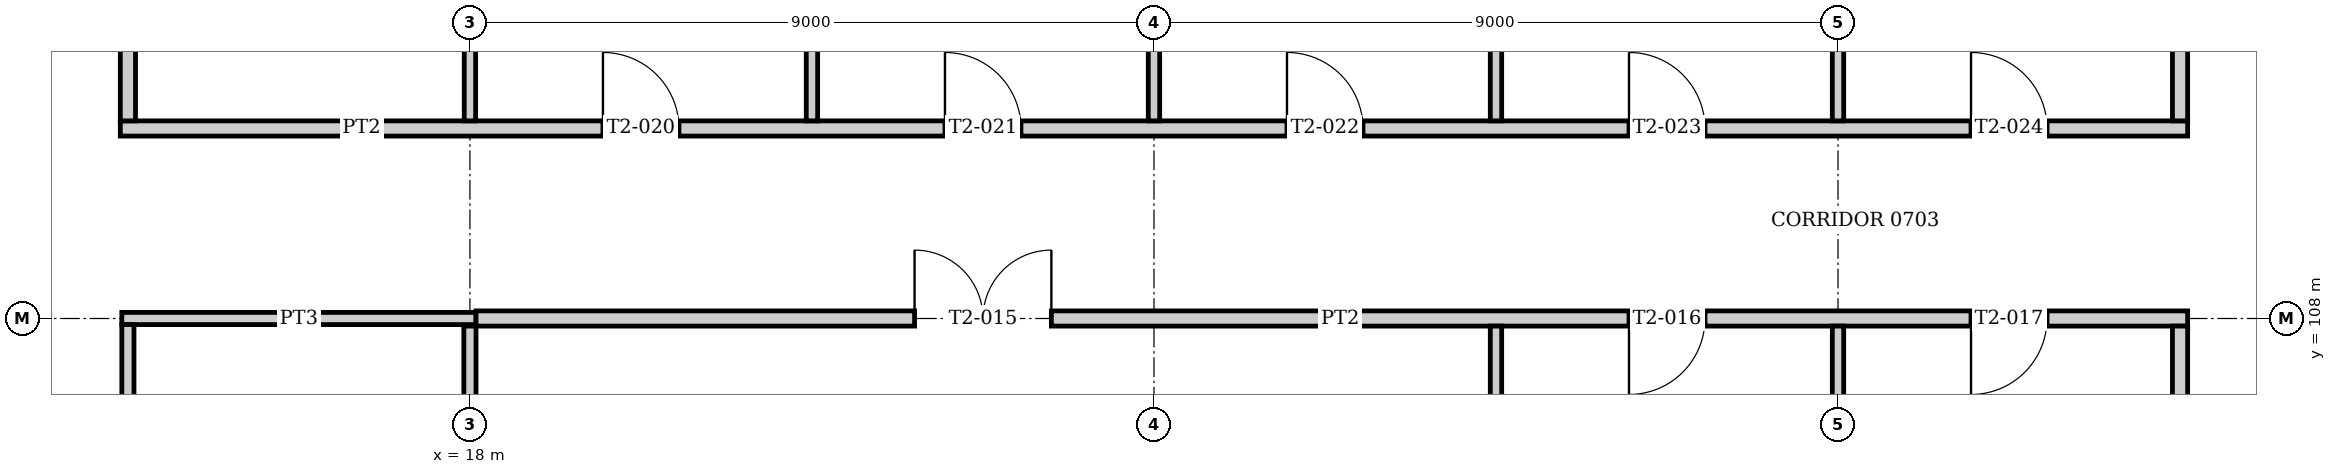
"""IFC4 building model, lengths in metres.
Left out: names, types, materials, properties, quantities, classifications, styles, units other than length and angle.
Written with IfcOpenShell. Run it as: python <this file> out.ifc"""

import sys

from ifc_helpers import new_model, si_unit, direction, frame, frame_2d, origin, place, context, subcontext, project, spatial, rectangle, extrude, element, fill, save


model = new_model("IFC4")
c1 = context("Model", 3, precision=1e-05, world=origin(), true_north=direction((0.0, 1.0)))
c2 = subcontext(c1, "Body", "Model", "MODEL_VIEW")
j1 = project(units=[si_unit("LENGTHUNIT", "METRE"), si_unit("PLANEANGLEUNIT", "RADIAN")], contexts=[c1])
p1 = place(None, origin())
s1 = spatial("IfcSite", under=j1, at=p1, CompositionType="ELEMENT")
p2 = place(p1, origin())
s2 = spatial("IfcBuilding", under=s1, at=p2, CompositionType="ELEMENT")
p3 = place(p2, frame((0.0, 0.0, 31.2)))
s3 = spatial("IfcBuildingStorey", under=s2, at=p3, CompositionType="ELEMENT", Elevation=31.2)
p4 = place(p3, frame((13.42, 108.0, 0.0), z_axis=(0.0, 0.0, 1.0), x_axis=(1.0, 0.0, 0.0)))
e1 = element("IfcWall", 1, at=p4, inside=s3, PredefinedType="PARTITIONING", context=c2, shape_type="SweptSolid", body=[
    extrude(rectangle(XDim=4.66, YDim=0.16, at=frame_2d((2.33, 0.0))), origin(), (0.0, 0.0, 1.0), 3.05),
])
p5 = place(p3, frame((18.08, 108.0, 0.0), z_axis=(0.0, 0.0, 1.0), x_axis=(1.0, 0.0, 0.0)))
e2 = element("IfcWall", 2, at=p5, inside=s3, PredefinedType="PARTITIONING", context=c2, shape_type="SweptSolid", body=[
    extrude(rectangle(XDim=22.52, YDim=0.2, at=frame_2d((11.26, 0.0))), origin(), (0.0, 0.0, 1.0), 3.05),
])
p6 = place(p5, frame((5.77, 0.0, 0.0)))
e3 = element("IfcOpeningElement", 3, at=p6, cuts=e2, PredefinedType="OPENING", context=c2, shape_type="SweptSolid", body=[
    extrude(rectangle(XDim=1.8, YDim=2.1, at=frame_2d((0.9, 1.05))), frame((0.0, 0.11, 0.0), z_axis=(0.0, -1.0, 0.0), x_axis=(1.0, 0.0, 0.0)), (0.0, 0.0, 1.0), 0.22),
])
p7 = place(p5, frame((15.17, 0.0, 0.0)))
e4 = element("IfcOpeningElement", 4, at=p7, cuts=e2, PredefinedType="OPENING", context=c2, shape_type="SweptSolid", body=[
    extrude(rectangle(XDim=1.0, YDim=2.1, at=frame_2d((0.5, 1.05))), frame((0.0, 0.11, 0.0), z_axis=(0.0, -1.0, 0.0), x_axis=(1.0, 0.0, 0.0)), (0.0, 0.0, 1.0), 0.22),
])
p8 = place(p5, frame((19.67, 0.0, 0.0)))
e5 = element("IfcOpeningElement", 5, at=p8, cuts=e2, PredefinedType="OPENING", context=c2, shape_type="SweptSolid", body=[
    extrude(rectangle(XDim=1.0, YDim=2.1, at=frame_2d((0.5, 1.05))), frame((0.0, 0.11, 0.0), z_axis=(0.0, -1.0, 0.0), x_axis=(1.0, 0.0, 0.0)), (0.0, 0.0, 1.0), 0.22),
])
p9 = place(p3, frame((13.4, 110.5, 0.0), z_axis=(0.0, 0.0, 1.0), x_axis=(1.0, 0.0, 0.0)))
e6 = element("IfcWall", 6, at=p9, inside=s3, PredefinedType="PARTITIONING", context=c2, shape_type="SweptSolid", body=[
    extrude(rectangle(XDim=27.2, YDim=0.2, at=frame_2d((13.6, 0.0))), origin(), (0.0, 0.0, 1.0), 3.05),
])
p10 = place(p9, frame((6.35, 0.0, 0.0)))
e7 = element("IfcOpeningElement", 7, at=p10, cuts=e6, PredefinedType="OPENING", context=c2, shape_type="SweptSolid", body=[
    extrude(rectangle(XDim=1.0, YDim=2.1, at=frame_2d((0.5, 1.05))), frame((0.0, 0.11, 0.0), z_axis=(0.0, -1.0, 0.0), x_axis=(1.0, 0.0, 0.0)), (0.0, 0.0, 1.0), 0.22),
])
p11 = place(p9, frame((10.85, 0.0, 0.0)))
e8 = element("IfcOpeningElement", 8, at=p11, cuts=e6, PredefinedType="OPENING", context=c2, shape_type="SweptSolid", body=[
    extrude(rectangle(XDim=1.0, YDim=2.1, at=frame_2d((0.5, 1.05))), frame((0.0, 0.11, 0.0), z_axis=(0.0, -1.0, 0.0), x_axis=(1.0, 0.0, 0.0)), (0.0, 0.0, 1.0), 0.22),
])
p12 = place(p9, frame((15.35, 0.0, 0.0)))
e9 = element("IfcOpeningElement", 9, at=p12, cuts=e6, PredefinedType="OPENING", context=c2, shape_type="SweptSolid", body=[
    extrude(rectangle(XDim=1.0, YDim=2.1, at=frame_2d((0.5, 1.05))), frame((0.0, 0.11, 0.0), z_axis=(0.0, -1.0, 0.0), x_axis=(1.0, 0.0, 0.0)), (0.0, 0.0, 1.0), 0.22),
])
p13 = place(p9, frame((19.85, 0.0, 0.0)))
e10 = element("IfcOpeningElement", 10, at=p13, cuts=e6, PredefinedType="OPENING", context=c2, shape_type="SweptSolid", body=[
    extrude(rectangle(XDim=1.0, YDim=2.1, at=frame_2d((0.5, 1.05))), frame((0.0, 0.11, 0.0), z_axis=(0.0, -1.0, 0.0), x_axis=(1.0, 0.0, 0.0)), (0.0, 0.0, 1.0), 0.22),
])
p14 = place(p9, frame((24.35, 0.0, 0.0)))
e11 = element("IfcOpeningElement", 11, at=p14, cuts=e6, PredefinedType="OPENING", context=c2, shape_type="SweptSolid", body=[
    extrude(rectangle(XDim=1.0, YDim=2.1, at=frame_2d((0.5, 1.05))), frame((0.0, 0.11, 0.0), z_axis=(0.0, -1.0, 0.0), x_axis=(1.0, 0.0, 0.0)), (0.0, 0.0, 1.0), 0.22),
])
p15 = place(p3, frame((13.5, 103.58, 0.0), z_axis=(0.0, 0.0, 1.0), x_axis=(0.0, 1.0, 0.0)))
e12 = element("IfcWall", 12, at=p15, inside=s3, PredefinedType="PARTITIONING", context=c2, shape_type="SweptSolid", body=[
    extrude(rectangle(XDim=4.34, YDim=0.16, at=frame_2d((2.17, 0.0))), origin(), (0.0, 0.0, 1.0), 3.05),
])
p16 = place(p15, frame((1.795, 0.0, 0.0)))
e13 = element("IfcOpeningElement", 13, at=p16, cuts=e12, PredefinedType="OPENING", context=c2, shape_type="SweptSolid", body=[
    extrude(rectangle(XDim=0.75, YDim=2.1, at=frame_2d((0.375, 1.05))), frame((0.0, 0.09, 0.0), z_axis=(0.0, -1.0, 0.0), x_axis=(1.0, 0.0, 0.0)), (0.0, 0.0, 1.0), 0.18),
])
p17 = place(p3, frame((13.5, 110.6, 0.0), z_axis=(0.0, 0.0, 1.0), x_axis=(0.0, 1.0, 0.0)))
e14 = element("IfcWall", 14, at=p17, inside=s3, PredefinedType="PARTITIONING", context=c2, shape_type="SweptSolid", body=[
    extrude(rectangle(XDim=6.31, YDim=0.2, at=frame_2d((3.155, 0.0))), origin(), (0.0, 0.0, 1.0), 3.05),
])
p18 = place(p17, frame((1.25, 0.0, 0.0)))
e15 = element("IfcOpeningElement", 15, at=p18, cuts=e14, PredefinedType="OPENING", context=c2, shape_type="SweptSolid", body=[
    extrude(rectangle(XDim=0.8, YDim=2.1, at=frame_2d((0.4, 1.05))), frame((0.0, 0.11, 0.0), z_axis=(0.0, -1.0, 0.0), x_axis=(1.0, 0.0, 0.0)), (0.0, 0.0, 1.0), 0.22),
])
p19 = place(p17, frame((4.44, 0.0, 0.0)))
e16 = element("IfcOpeningElement", 16, at=p19, cuts=e14, PredefinedType="OPENING", context=c2, shape_type="SweptSolid", body=[
    extrude(rectangle(XDim=0.92, YDim=2.1, at=frame_2d((0.46, 1.05))), frame((0.0, 0.11, 0.0), z_axis=(0.0, -1.0, 0.0), x_axis=(1.0, 0.0, 0.0)), (0.0, 0.0, 1.0), 0.22),
])
p20 = place(p3, frame((18.0, 103.58, 0.0), z_axis=(0.0, 0.0, 1.0), x_axis=(0.0, 1.0, 0.0)))
e17 = element("IfcWall", 17, at=p20, inside=s3, PredefinedType="PARTITIONING", context=c2, shape_type="SweptSolid", body=[
    extrude(rectangle(XDim=4.32, YDim=0.16, at=frame_2d((2.16, 0.0))), origin(), (0.0, 0.0, 1.0), 3.05),
])
p21 = place(p3, frame((18.0, 110.6, 0.0), z_axis=(0.0, 0.0, 1.0), x_axis=(0.0, 1.0, 0.0)))
e18 = element("IfcWall", 18, at=p21, inside=s3, PredefinedType="PARTITIONING", context=c2, shape_type="SweptSolid", body=[
    extrude(rectangle(XDim=6.6, YDim=0.15, at=frame_2d((3.3, 0.0))), origin(), (0.0, 0.0, 1.0), 3.05),
])
p22 = place(p3, frame((22.5, 110.6, 0.0), z_axis=(0.0, 0.0, 1.0), x_axis=(0.0, 1.0, 0.0)))
e19 = element("IfcWall", 19, at=p22, inside=s3, PredefinedType="PARTITIONING", context=c2, shape_type="SweptSolid", body=[
    extrude(rectangle(XDim=6.31, YDim=0.15, at=frame_2d((3.155, 0.0))), origin(), (0.0, 0.0, 1.0), 3.05),
])
p23 = place(p3, frame((27.0, 110.6, 0.0), z_axis=(0.0, 0.0, 1.0), x_axis=(0.0, 1.0, 0.0)))
e20 = element("IfcWall", 20, at=p23, inside=s3, PredefinedType="PARTITIONING", context=c2, shape_type="SweptSolid", body=[
    extrude(rectangle(XDim=6.6, YDim=0.15, at=frame_2d((3.3, 0.0))), origin(), (0.0, 0.0, 1.0), 3.05),
])
p24 = place(p3, frame((31.5, 99.075, 0.0), z_axis=(0.0, 0.0, 1.0), x_axis=(0.0, 1.0, 0.0)))
e21 = element("IfcWall", 21, at=p24, inside=s3, PredefinedType="PARTITIONING", context=c2, shape_type="SweptSolid", body=[
    extrude(rectangle(XDim=8.825, YDim=0.15, at=frame_2d((4.413, 0.0))), origin(), (0.0, 0.0, 1.0), 3.05),
])
p25 = place(p3, frame((31.5, 110.6, 0.0), z_axis=(0.0, 0.0, 1.0), x_axis=(0.0, 1.0, 0.0)))
e22 = element("IfcWall", 22, at=p25, inside=s3, PredefinedType="PARTITIONING", context=c2, shape_type="SweptSolid", body=[
    extrude(rectangle(XDim=6.31, YDim=0.15, at=frame_2d((3.155, 0.0))), origin(), (0.0, 0.0, 1.0), 3.05),
])
p26 = place(p3, frame((36.0, 99.207, 0.0), z_axis=(0.0, 0.0, 1.0), x_axis=(0.0, 1.0, 0.0)))
e23 = element("IfcWall", 23, at=p26, inside=s3, PredefinedType="PARTITIONING", context=c2, shape_type="SweptSolid", body=[
    extrude(rectangle(XDim=8.693, YDim=0.15, at=frame_2d((4.346, 0.0))), origin(), (0.0, 0.0, 1.0), 3.05),
])
p27 = place(p3, frame((36.0, 110.6, 0.0), z_axis=(0.0, 0.0, 1.0), x_axis=(0.0, 1.0, 0.0)))
e24 = element("IfcWall", 24, at=p27, inside=s3, PredefinedType="PARTITIONING", context=c2, shape_type="SweptSolid", body=[
    extrude(rectangle(XDim=6.6, YDim=0.15, at=frame_2d((3.3, 0.0))), origin(), (0.0, 0.0, 1.0), 3.05),
])
p28 = place(p3, frame((40.5, 99.075, 0.0), z_axis=(0.0, 0.0, 1.0), x_axis=(0.0, 1.0, 0.0)))
e25 = element("IfcWall", 25, at=p28, inside=s3, PredefinedType="PARTITIONING", context=c2, shape_type="SweptSolid", body=[
    extrude(rectangle(XDim=8.825, YDim=0.2, at=frame_2d((4.413, 0.0))), origin(), (0.0, 0.0, 1.0), 3.05),
])
p29 = place(p3, frame((40.5, 110.6, 0.0), z_axis=(0.0, 0.0, 1.0), x_axis=(0.0, 1.0, 0.0)))
e26 = element("IfcWall", 26, at=p29, inside=s3, PredefinedType="PARTITIONING", context=c2, shape_type="SweptSolid", body=[
    extrude(rectangle(XDim=6.31, YDim=0.2, at=frame_2d((3.155, 0.0))), origin(), (0.0, 0.0, 1.0), 3.05),
])
p30 = place(p6, origin())
e27 = element("IfcDoor", 27, at=p30, inside=s3, OperationType="DOUBLE_DOOR_SINGLE_SWING", PredefinedType="DOOR", context=c2, shape_type="SweptSolid", body=[
    extrude(rectangle(XDim=1.8, YDim=2.1, at=frame_2d((0.9, 1.05))), frame((0.0, 0.025, 0.0), z_axis=(0.0, -1.0, 0.0), x_axis=(1.0, 0.0, 0.0)), (0.0, 0.0, 1.0), 0.05),
])
fill(e3, e27)
p31 = place(p7, frame((1.0, 0.0, 0.0), z_axis=(0.0, 0.0, 1.0), x_axis=(-1.0, 0.0, 0.0)))
e28 = element("IfcDoor", 28, at=p31, inside=s3, OperationType="SINGLE_SWING_RIGHT", PredefinedType="DOOR", context=c2, shape_type="SweptSolid", body=[
    extrude(rectangle(XDim=1.0, YDim=2.1, at=frame_2d((0.5, 1.05))), frame((0.0, 0.025, 0.0), z_axis=(0.0, -1.0, 0.0), x_axis=(1.0, 0.0, 0.0)), (0.0, 0.0, 1.0), 0.05),
])
fill(e4, e28)
p32 = place(p8, frame((1.0, 0.0, 0.0), z_axis=(0.0, 0.0, 1.0), x_axis=(-1.0, 0.0, 0.0)))
e29 = element("IfcDoor", 29, at=p32, inside=s3, OperationType="SINGLE_SWING_RIGHT", PredefinedType="DOOR", context=c2, shape_type="SweptSolid", body=[
    extrude(rectangle(XDim=1.0, YDim=2.1, at=frame_2d((0.5, 1.05))), frame((0.0, 0.025, 0.0), z_axis=(0.0, -1.0, 0.0), x_axis=(1.0, 0.0, 0.0)), (0.0, 0.0, 1.0), 0.05),
])
fill(e5, e29)
p33 = place(p10, origin())
e30 = element("IfcDoor", 30, at=p33, inside=s3, OperationType="SINGLE_SWING_LEFT", PredefinedType="DOOR", context=c2, shape_type="SweptSolid", body=[
    extrude(rectangle(XDim=1.0, YDim=2.1, at=frame_2d((0.5, 1.05))), frame((0.0, 0.025, 0.0), z_axis=(0.0, -1.0, 0.0), x_axis=(1.0, 0.0, 0.0)), (0.0, 0.0, 1.0), 0.05),
])
fill(e7, e30)
p34 = place(p11, origin())
e31 = element("IfcDoor", 31, at=p34, inside=s3, OperationType="SINGLE_SWING_LEFT", PredefinedType="DOOR", context=c2, shape_type="SweptSolid", body=[
    extrude(rectangle(XDim=1.0, YDim=2.1, at=frame_2d((0.5, 1.05))), frame((0.0, 0.025, 0.0), z_axis=(0.0, -1.0, 0.0), x_axis=(1.0, 0.0, 0.0)), (0.0, 0.0, 1.0), 0.05),
])
fill(e8, e31)
p35 = place(p12, origin())
e32 = element("IfcDoor", 32, at=p35, inside=s3, OperationType="SINGLE_SWING_LEFT", PredefinedType="DOOR", context=c2, shape_type="SweptSolid", body=[
    extrude(rectangle(XDim=1.0, YDim=2.1, at=frame_2d((0.5, 1.05))), frame((0.0, 0.025, 0.0), z_axis=(0.0, -1.0, 0.0), x_axis=(1.0, 0.0, 0.0)), (0.0, 0.0, 1.0), 0.05),
])
fill(e9, e32)
p36 = place(p13, origin())
e33 = element("IfcDoor", 33, at=p36, inside=s3, OperationType="SINGLE_SWING_LEFT", PredefinedType="DOOR", context=c2, shape_type="SweptSolid", body=[
    extrude(rectangle(XDim=1.0, YDim=2.1, at=frame_2d((0.5, 1.05))), frame((0.0, 0.025, 0.0), z_axis=(0.0, -1.0, 0.0), x_axis=(1.0, 0.0, 0.0)), (0.0, 0.0, 1.0), 0.05),
])
fill(e10, e33)
p37 = place(p14, origin())
e34 = element("IfcDoor", 34, at=p37, inside=s3, OperationType="SINGLE_SWING_LEFT", PredefinedType="DOOR", context=c2, shape_type="SweptSolid", body=[
    extrude(rectangle(XDim=1.0, YDim=2.1, at=frame_2d((0.5, 1.05))), frame((0.0, 0.025, 0.0), z_axis=(0.0, -1.0, 0.0), x_axis=(1.0, 0.0, 0.0)), (0.0, 0.0, 1.0), 0.05),
])
fill(e11, e34)
save(model, sys.argv[1])
